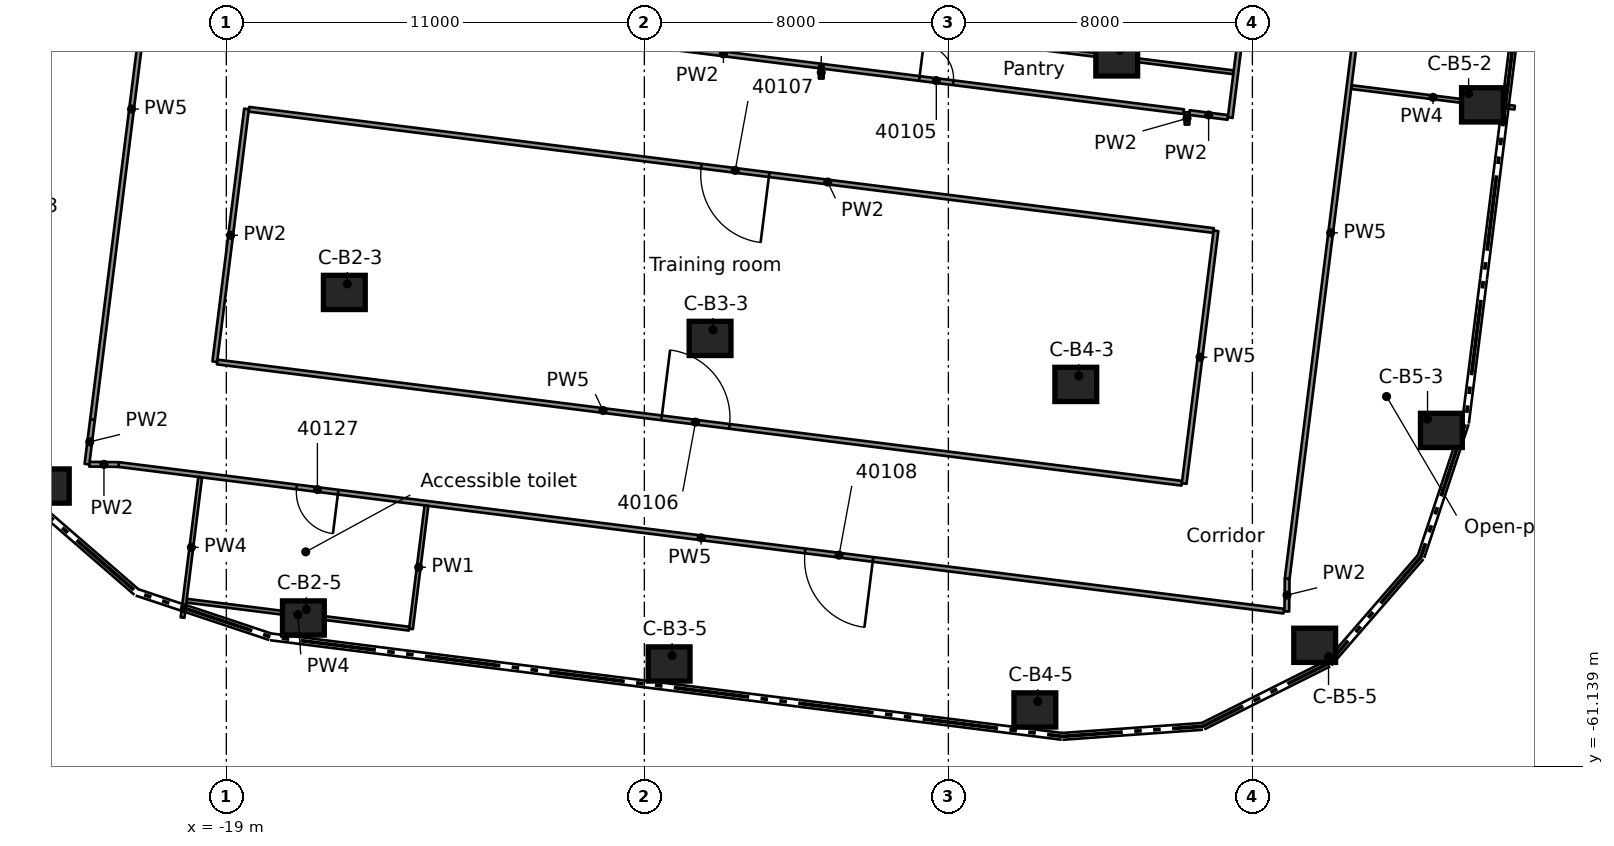
"""IFC4 building model, lengths in metres.
Left out: names, types, materials, properties, quantities, classifications, styles, units other than length and angle.
Written with IfcOpenShell. Run it as: python <this file> out.ifc"""

import sys

from ifc_helpers import new_model, si_unit, direction, frame, frame_2d, origin, origin_2d, place, context, subcontext, project, spatial, rectangle, extrude, element, fill, save


model = new_model("IFC4")
c1 = context("Model", 3, precision=1e-05, world=origin(), true_north=direction((0.0, 1.0)))
c2 = subcontext(c1, "Body", "Model", "MODEL_VIEW")
j1 = project(units=[si_unit("LENGTHUNIT", "METRE"), si_unit("PLANEANGLEUNIT", "RADIAN")], contexts=[c1])
p1 = place(None, origin())
s1 = spatial("IfcSite", under=j1, at=p1, CompositionType="ELEMENT")
p2 = place(p1, origin())
s2 = spatial("IfcBuilding", under=s1, at=p2, CompositionType="ELEMENT")
p3 = place(p2, frame((0.0, 0.0, 199.1)))
s3 = spatial("IfcBuildingStorey", under=s2, at=p3, CompositionType="ELEMENT", Elevation=199.1)
for number, where, z_axis, x_axis in (
    (1, (-23.685, -53.758, 0.0), (0.0, 0.0, 1.0), (1.0, 0.0, 0.0)),
    (2, (-15.895, -48.664, 0.0), (0.0, 0.0, 1.0), (1.0, 0.0, 0.0)),
    (3, (-16.972, -57.23, 0.0), (0.0, 0.0, 1.0), (1.0, 0.0, 0.0)),
    (4, (-6.271, -49.874, 0.0), (0.0, 0.0, 1.0), (1.0, 0.0, 0.0)),
    (5, (-7.348, -58.44, 0.0), (0.0, 0.0, 1.0), (1.0, 0.0, 0.0)),
    (6, (4.43, -42.518, 0.0), (0.0, 0.0, 1.0), (1.0, 0.0, 0.0)),
    (7, (3.353, -51.084, 0.0), (0.0, 0.0, 1.0), (1.0, 0.0, 0.0)),
    (8, (2.276, -59.65, 0.0), (0.0, 0.0, 1.0), (1.0, 0.0, 0.0)),
    (9, (14.054, -43.728, 0.0), (0.0, 0.0, 1.0), (1.0, 0.0, 0.0)),
    (10, (12.973, -52.294, 0.0), (0.0, 0.0, 1.0), (1.0, 0.0, 0.0)),
    (11, (9.639, -57.949, 0.0), (0.0, 0.0, 1.0), (1.0, 0.0, 0.0)),
):
    element("IfcColumn", number, at=place(p3, frame(where, z_axis=z_axis, x_axis=x_axis)), inside=s3, PredefinedType="COLUMN", context=c2, shape_type="SweptSolid", body=[
        extrude(rectangle(XDim=1.1, YDim=0.9, at=origin_2d()), origin(), (0.0, 0.0, 1.0), 3.5),
    ])
p4 = place(p3, frame((-20.045, -56.775, 0.0), z_axis=(0.0, 0.0, 1.0), x_axis=(0.992184639026, -0.124778371847, 0.0)))
e12 = element("IfcWall", 12, at=p4, inside=s3, PredefinedType="PARTITIONING", context=c2, shape_type="SweptSolid", body=[
    extrude(rectangle(XDim=5.899, YDim=0.1, at=frame_2d((2.95, 0.0))), origin(), (0.0, 0.0, 1.0), 2.395),
])
p5 = place(p3, frame((8.823, -57.049, 0.0), z_axis=(0.0, 0.0, 1.0), x_axis=(-0.992177755652, 0.124833093322, 0.0)))
e13 = element("IfcWall", 13, at=p5, inside=s3, PredefinedType="PARTITIONING", context=c2, shape_type="SweptSolid", body=[
    extrude(rectangle(XDim=30.899, YDim=0.125, at=frame_2d((15.449, 0.0))), origin(), (0.0, 0.0, 1.0), 2.395),
])
p6 = place(p5, frame((10.892, 0.0, 0.0)))
e14 = element("IfcOpeningElement", 14, at=p6, cuts=e13, PredefinedType="OPENING", context=c2, shape_type="SweptSolid", body=[
    extrude(rectangle(XDim=1.8, YDim=2.1, at=frame_2d((0.9, 1.05))), frame((0.0, 0.073, 0.0), z_axis=(0.0, -1.0, 0.0), x_axis=(1.0, 0.0, 0.0)), (0.0, 0.0, 1.0), 0.145),
])
p7 = place(p5, frame((25.077, 0.0, 0.0)))
e15 = element("IfcOpeningElement", 15, at=p7, cuts=e13, PredefinedType="OPENING", context=c2, shape_type="SweptSolid", body=[
    extrude(rectangle(XDim=1.1, YDim=2.1, at=frame_2d((0.55, 1.05))), frame((0.0, 0.073, 0.0), z_axis=(0.0, -1.0, 0.0), x_axis=(1.0, 0.0, 0.0)), (0.0, 0.0, 1.0), 0.145),
])
p8 = place(p3, frame((-19.242, -50.494, 0.0), z_axis=(0.0, 0.0, 1.0), x_axis=(0.992190871449, -0.124728804262, 0.0)))
e16 = element("IfcWall", 16, at=p8, inside=s3, PredefinedType="PARTITIONING", context=c2, shape_type="SweptSolid", body=[
    extrude(rectangle(XDim=25.585, YDim=0.125, at=frame_2d((12.792, 0.0))), origin(), (0.0, 0.0, 1.0), 2.395),
])
p9 = place(p8, frame((11.788, 0.0, 0.0)))
e17 = element("IfcOpeningElement", 17, at=p9, cuts=e16, PredefinedType="OPENING", context=c2, shape_type="SweptSolid", body=[
    extrude(rectangle(XDim=1.8, YDim=2.1, at=frame_2d((0.9, 1.05))), frame((0.0, 0.073, 0.0), z_axis=(0.0, -1.0, 0.0), x_axis=(1.0, 0.0, 0.0)), (0.0, 0.0, 1.0), 0.145),
])
p10 = place(p3, frame((6.979, -47.035, 0.0), z_axis=(0.0, 0.0, 1.0), x_axis=(-0.992192052325, 0.124719410292, 0.0)))
e18 = element("IfcWall", 18, at=p10, inside=s3, PredefinedType="PARTITIONING", context=c2, shape_type="SweptSolid", body=[
    extrude(rectangle(XDim=25.585, YDim=0.125, at=frame_2d((12.792, 0.0))), origin(), (0.0, 0.0, 1.0), 3.03),
])
p11 = place(p10, frame((11.788, 0.0, 0.0)))
e19 = element("IfcOpeningElement", 19, at=p11, cuts=e18, PredefinedType="OPENING", context=c2, shape_type="SweptSolid", body=[
    extrude(rectangle(XDim=1.8, YDim=2.1, at=frame_2d((0.9, 1.05))), frame((0.0, 0.073, 0.0), z_axis=(0.0, -1.0, 0.0), x_axis=(1.0, 0.0, 0.0)), (0.0, 0.0, 1.0), 0.145),
])
p12 = place(p3, frame((-18.032, -40.866, 0.0), z_axis=(0.0, 0.0, 1.0), x_axis=(0.9922120451, -0.124560256738, 0.0)))
e20 = element("IfcWall", 20, at=p12, inside=s3, PredefinedType="PARTITIONING", context=c2, shape_type="SweptSolid", body=[
    extrude(rectangle(XDim=24.414, YDim=0.125, at=frame_2d((12.207, 0.0))), origin(), (0.0, 0.0, 1.0), 3.03),
])
p13 = place(p12, frame((17.404, 0.0, 0.0)))
e21 = element("IfcOpeningElement", 21, at=p13, cuts=e20, PredefinedType="OPENING", context=c2, shape_type="SweptSolid", body=[
    extrude(rectangle(XDim=0.9, YDim=2.1, at=frame_2d((0.45, 1.05))), frame((0.0, 0.073, 0.0), z_axis=(0.0, -1.0, 0.0), x_axis=(1.0, 0.0, 0.0)), (0.0, 0.0, 1.0), 0.145),
])
p14 = place(p3, frame((6.342, -43.931, 0.0), z_axis=(0.0, 0.0, 1.0), x_axis=(0.992192944833, -0.124712309833, 0.0)))
e22 = element("IfcWall", 22, at=p14, inside=s3, PredefinedType="PARTITIONING", context=c2, shape_type="SweptSolid", body=[
    extrude(rectangle(XDim=1.02, YDim=0.125, at=frame_2d((0.51, 0.0))), origin(), (0.0, 0.0, 1.0), 3.03),
])
p15 = place(p3, frame((-17.883, -39.679, 0.0), z_axis=(0.0, 0.0, 1.0), x_axis=(0.992186741223, -0.124761654932, 0.0)))
e23 = element("IfcWall", 23, at=p15, inside=s3, PredefinedType="PARTITIONING", context=c2, shape_type="SweptSolid", body=[
    extrude(rectangle(XDim=25.586, YDim=0.1, at=frame_2d((12.793, 0.0))), origin(), (0.0, 0.0, 1.0), 2.395),
])
p16 = place(p3, frame((10.605, -43.261, 0.0), z_axis=(0.0, 0.0, 1.0), x_axis=(0.992195268651, -0.124693820479, 0.0)))
e24 = element("IfcWall", 24, at=p16, inside=s3, PredefinedType="PARTITIONING", context=c2, shape_type="SweptSolid", body=[
    extrude(rectangle(XDim=4.331, YDim=0.1, at=frame_2d((2.166, 0.0))), origin(), (0.0, 0.0, 1.0), 2.395),
])
p17 = place(p3, frame((-22.606, -53.184, 0.0), z_axis=(0.0, 0.0, 1.0), x_axis=(0.999948794941, -0.010119658899, 0.0)))
e25 = element("IfcWall", 25, at=p17, inside=s3, PredefinedType="PARTITIONING", context=c2, shape_type="SweptSolid", body=[
    extrude(rectangle(XDim=0.772, YDim=0.125, at=frame_2d((0.386, 0.0))), origin(), (0.0, 0.0, 1.0), 3.03),
])
p18 = place(p3, frame((11.204, -37.994, 0.0), z_axis=(0.0, 0.0, 1.0), x_axis=(-0.124761850955, -0.992186716574, 0.0)))
e26 = element("IfcWall", 26, at=p18, inside=s3, PredefinedType="PARTITIONING", context=c2, shape_type="SweptSolid", body=[
    extrude(rectangle(XDim=18.347, YDim=0.125, at=frame_2d((9.174, 0.0))), origin(), (0.0, 0.0, 1.0), 2.395),
])
p19 = place(p18, frame((3.225, 0.0, 0.0)))
e27 = element("IfcOpeningElement", 27, at=p19, cuts=e26, PredefinedType="OPENING", context=c2, shape_type="SweptSolid", body=[
    extrude(rectangle(XDim=0.9, YDim=2.1, at=frame_2d((0.45, 1.05))), frame((0.0, 0.073, 0.0), z_axis=(0.0, -1.0, 0.0), x_axis=(1.0, 0.0, 0.0)), (0.0, 0.0, 1.0), 0.145),
])
p20 = place(p3, frame((6.205, -53.693, 0.0), z_axis=(0.0, 0.0, 1.0), x_axis=(0.124720623553, 0.992191899816, 0.0)))
e28 = element("IfcWall", 28, at=p20, inside=s3, PredefinedType="PARTITIONING", context=c2, shape_type="SweptSolid", body=[
    extrude(rectangle(XDim=6.702, YDim=0.125, at=frame_2d((3.351, 0.0))), origin(), (0.0, 0.0, 1.0), 2.395),
])
p21 = place(p3, frame((7.416, -44.066, 0.0), z_axis=(0.0, 0.0, 1.0), x_axis=(0.124521004899, 0.992216971906, 0.0)))
e29 = element("IfcWall", 29, at=p21, inside=s3, PredefinedType="PARTITIONING", context=c2, shape_type="SweptSolid", body=[
    extrude(rectangle(XDim=11.74, YDim=0.125, at=frame_2d((5.87, 0.0))), origin(), (0.0, 0.0, 1.0), 2.395),
])
p22 = place(p21, frame((8.597, 0.0, 0.0)))
e30 = element("IfcOpeningElement", 30, at=p22, cuts=e29, PredefinedType="OPENING", context=c2, shape_type="SweptSolid", body=[
    extrude(rectangle(XDim=0.9, YDim=2.1, at=frame_2d((0.45, 1.05))), frame((0.0, 0.073, 0.0), z_axis=(0.0, -1.0, 0.0), x_axis=(1.0, 0.0, 0.0)), (0.0, 0.0, 1.0), 0.145),
])
p23 = place(p21, frame((3.296, 0.0, 0.0)))
e31 = element("IfcOpeningElement", 31, at=p23, cuts=e29, PredefinedType="OPENING", context=c2, shape_type="SweptSolid", body=[
    extrude(rectangle(XDim=0.9, YDim=2.1, at=frame_2d((0.45, 1.05))), frame((0.0, 0.073, 0.0), z_axis=(0.0, -1.0, 0.0), x_axis=(1.0, 0.0, 0.0)), (0.0, 0.0, 1.0), 0.145),
])
p24 = place(p3, frame((-14.141, -57.517, 0.0), z_axis=(0.0, 0.0, 1.0), x_axis=(0.124586287257, 0.992208776935, 0.0)))
e32 = element("IfcWall", 32, at=p24, inside=s3, PredefinedType="PARTITIONING", context=c2, shape_type="SweptSolid", body=[
    extrude(rectangle(XDim=3.269, YDim=0.1, at=frame_2d((1.634, 0.0))), origin(), (0.0, 0.0, 1.0), 3.03),
])
p25 = place(p3, frame((-19.304, -50.486, 0.0), z_axis=(0.0, 0.0, 1.0), x_axis=(0.124720623553, 0.992191899816, 0.0)))
e33 = element("IfcWall", 33, at=p25, inside=s3, PredefinedType="PARTITIONING", context=c2, shape_type="SweptSolid", body=[
    extrude(rectangle(XDim=6.702, YDim=0.125, at=frame_2d((3.351, 0.0))), origin(), (0.0, 0.0, 1.0), 3.03),
])
p26 = place(p3, frame((-20.152, -57.219, 0.0), z_axis=(0.0, 0.0, 1.0), x_axis=(0.124656149898, 0.992200002163, 0.0)))
e34 = element("IfcWall", 34, at=p26, inside=s3, PredefinedType="PARTITIONING", context=c2, shape_type="SweptSolid", body=[
    extrude(rectangle(XDim=3.723, YDim=0.1, at=frame_2d((1.862, 0.0))), origin(), (0.0, 0.0, 1.0), 2.395),
])
p27 = place(p3, frame((-22.52, -52.008, 0.0), z_axis=(0.0, 0.0, 1.0), x_axis=(0.124660538506, 0.992199450786, 0.0)))
e35 = element("IfcWall", 35, at=p27, inside=s3, PredefinedType="PARTITIONING", context=c2, shape_type="SweptSolid", body=[
    extrude(rectangle(XDim=16.469, YDim=0.125, at=frame_2d((8.234, 0.0))), origin(), (0.0, 0.0, 1.0), 2.395),
])
p28 = place(p27, frame((14.161, 0.0, 0.0)))
e36 = element("IfcOpeningElement", 36, at=p28, cuts=e35, PredefinedType="OPENING", context=c2, shape_type="SweptSolid", body=[
    extrude(rectangle(XDim=1.0, YDim=2.1, at=frame_2d((0.5, 1.05))), frame((0.0, 0.073, 0.0), z_axis=(0.0, -1.0, 0.0), x_axis=(1.0, 0.0, 0.0)), (0.0, 0.0, 1.0), 0.145),
])
p29 = place(p3, frame((-22.668, -53.182, 0.0), z_axis=(0.0, 0.0, 1.0), x_axis=(0.124237932287, 0.992252455871, 0.0)))
e37 = element("IfcWall", 37, at=p29, inside=s3, PredefinedType="PARTITIONING", context=c2, shape_type="SweptSolid", body=[
    extrude(rectangle(XDim=1.183, YDim=0.125, at=frame_2d((0.592, 0.0))), origin(), (0.0, 0.0, 1.0), 3.03),
])
p30 = place(p3, frame((8.906, -57.057, 0.0), z_axis=(0.0, 0.0, 1.0), x_axis=(0.010516757761, 0.999944697374, 0.0)))
e38 = element("IfcWall", 38, at=p30, inside=s3, PredefinedType="PARTITIONING", context=c2, shape_type="SweptSolid", body=[
    extrude(rectangle(XDim=0.859, YDim=0.125, at=frame_2d((0.429, 0.0))), origin(), (0.0, 0.0, 1.0), 3.03),
])
p31 = place(p3, frame((6.28, -44.247, 0.0), z_axis=(0.0, 0.0, 1.0), x_axis=(0.0, 1.0, 0.0)))
e39 = element("IfcWall", 39, at=p31, inside=s3, PredefinedType="PARTITIONING", context=c2, shape_type="SweptSolid", body=[
    extrude(rectangle(XDim=0.324, YDim=0.125, at=frame_2d((0.162, 0.0))), origin(), (0.0, 0.0, 1.0), 3.03),
])
p32 = place(p3, frame((-3.345, -43.037, 0.0), z_axis=(0.0, 0.0, 1.0), x_axis=(0.0, 1.0, 0.0)))
e40 = element("IfcWall", 40, at=p32, inside=s3, PredefinedType="PARTITIONING", context=c2, shape_type="SweptSolid", body=[
    extrude(rectangle(XDim=0.324, YDim=0.125, at=frame_2d((0.162, 0.0))), origin(), (0.0, 0.0, 1.0), 3.03),
])
p33 = place(p13, origin())
e41 = element("IfcDoor", 41, at=p33, inside=s3, OperationType="SINGLE_SWING_RIGHT", PredefinedType="DOOR", context=c2, shape_type="SweptSolid", body=[
    extrude(rectangle(XDim=0.9, YDim=2.1, at=frame_2d((0.45, 1.05))), frame((0.0, 0.025, 0.0), z_axis=(0.0, -1.0, 0.0), x_axis=(1.0, 0.0, 0.0)), (0.0, 0.0, 1.0), 0.05),
])
fill(e21, e41)
p34 = place(p9, origin())
e42 = element("IfcDoor", 42, at=p34, inside=s3, OperationType="DOUBLE_DOOR_SINGLE_SWING", PredefinedType="DOOR", context=c2, shape_type="SweptSolid", body=[
    extrude(rectangle(XDim=1.8, YDim=2.1, at=frame_2d((0.9, 1.05))), frame((0.0, 0.025, 0.0), z_axis=(0.0, -1.0, 0.0), x_axis=(1.0, 0.0, 0.0)), (0.0, 0.0, 1.0), 0.05),
])
fill(e17, e42)
p35 = place(p11, origin())
e43 = element("IfcDoor", 43, at=p35, inside=s3, OperationType="DOUBLE_DOOR_SINGLE_SWING", PredefinedType="DOOR", context=c2, shape_type="SweptSolid", body=[
    extrude(rectangle(XDim=1.8, YDim=2.1, at=frame_2d((0.9, 1.05))), frame((0.0, 0.025, 0.0), z_axis=(0.0, -1.0, 0.0), x_axis=(1.0, 0.0, 0.0)), (0.0, 0.0, 1.0), 0.05),
])
fill(e19, e43)
p36 = place(p6, origin())
e44 = element("IfcDoor", 44, at=p36, inside=s3, OperationType="DOUBLE_DOOR_SINGLE_SWING", PredefinedType="DOOR", context=c2, shape_type="SweptSolid", body=[
    extrude(rectangle(XDim=1.8, YDim=2.1, at=frame_2d((0.9, 1.05))), frame((0.0, 0.025, 0.0), z_axis=(0.0, -1.0, 0.0), x_axis=(1.0, 0.0, 0.0)), (0.0, 0.0, 1.0), 0.05),
])
fill(e14, e44)
p37 = place(p7, origin())
e45 = element("IfcDoor", 45, at=p37, inside=s3, OperationType="SINGLE_SWING_RIGHT", PredefinedType="DOOR", context=c2, shape_type="SweptSolid", body=[
    extrude(rectangle(XDim=1.1, YDim=2.1, at=frame_2d((0.55, 1.05))), frame((0.0, 0.025, 0.0), z_axis=(0.0, -1.0, 0.0), x_axis=(1.0, 0.0, 0.0)), (0.0, 0.0, 1.0), 0.05),
])
fill(e15, e45)
save(model, sys.argv[1])
